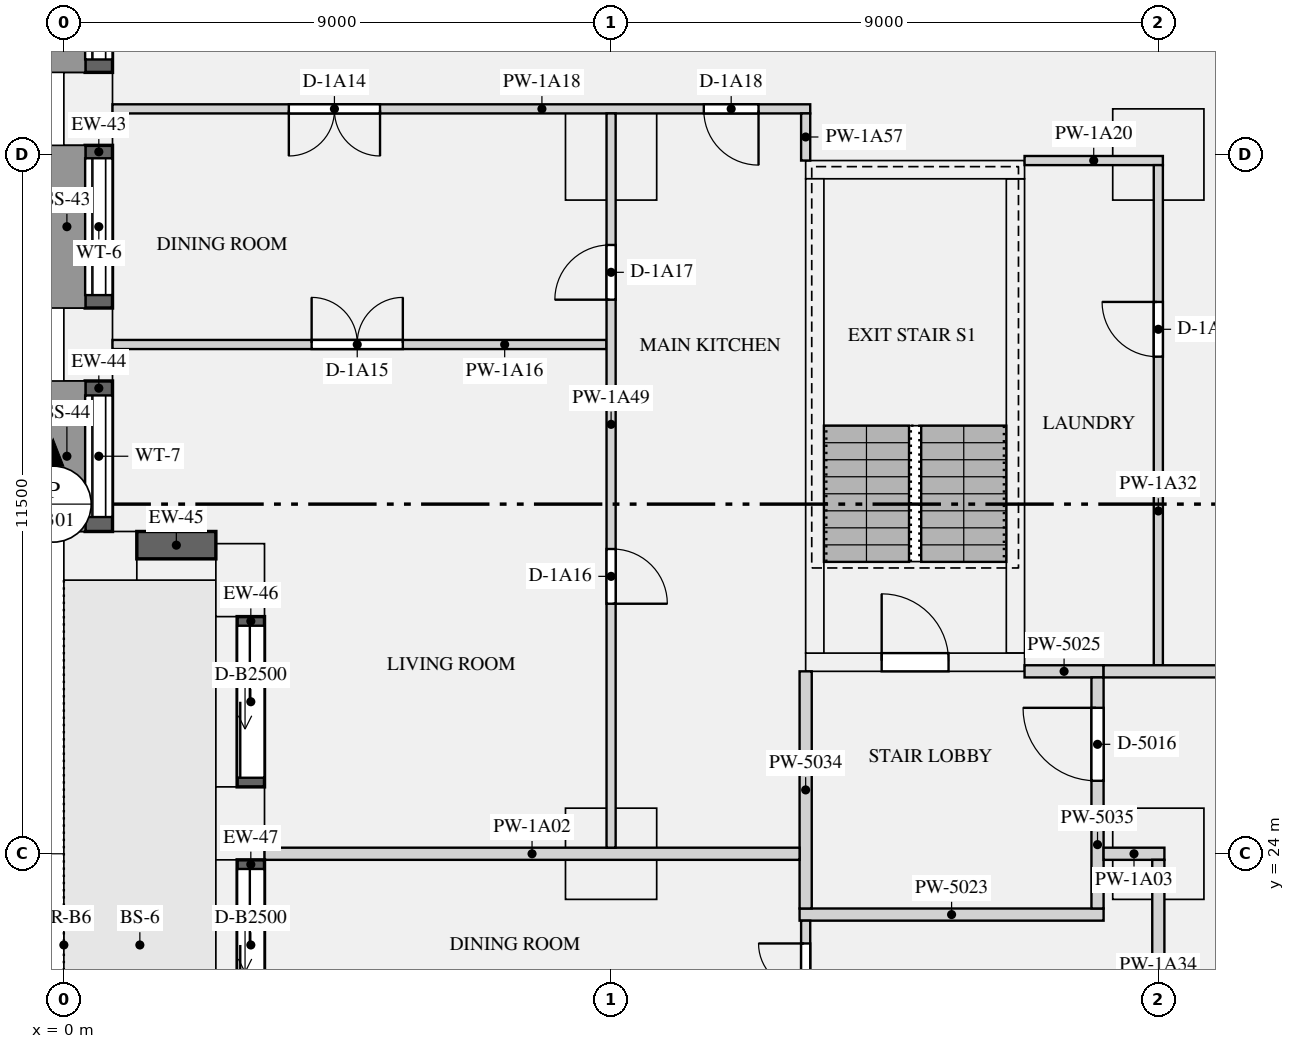
"""IFC4 building model, lengths in metres.
Left out: names, types, materials, properties, quantities, classifications, styles, units other than length and angle.
Written with IfcOpenShell. Run it as: python <this file> out.ifc"""

import sys

from ifc_helpers import new_model, si_unit, direction, frame, frame_2d, origin, origin_2d, place, context, subcontext, project, spatial, rectangle, extrude, element, fill, save


model = new_model("IFC4")
c1 = context("Model", 3, precision=1e-05, world=origin(), true_north=direction((0.0, 1.0)))
c2 = subcontext(c1, "Body", "Model", "MODEL_VIEW")
j1 = project(units=[si_unit("LENGTHUNIT", "METRE"), si_unit("PLANEANGLEUNIT", "RADIAN")], contexts=[c1])
p1 = place(None, origin())
s1 = spatial("IfcSite", under=j1, at=p1, CompositionType="ELEMENT")
p2 = place(p1, origin())
s2 = spatial("IfcBuilding", under=s1, at=p2, CompositionType="ELEMENT")
p3 = place(p2, frame((0.0, 0.0, 19.5)))
s3 = spatial("IfcBuildingStorey", under=s2, at=p3, CompositionType="ELEMENT", Elevation=19.5)
for number, where, z_axis, x_axis in (
    (1, (0.4, 36.25, -0.32), (0.0, 0.0, 1.0), (0.0, -1.0, 0.0)),
    (2, (0.4, 32.375, -0.32), (0.0, 0.0, 1.0), (0.0, -1.0, 0.0)),
):
    element("IfcColumn", number, at=place(p3, frame(where, z_axis=z_axis, x_axis=x_axis)), inside=s3, PredefinedType="USERDEFINED", context=c2, shape_type="SweptSolid", body=[
        extrude(rectangle(XDim=1.2, YDim=0.8, at=origin_2d()), origin(), (0.0, 0.0, 1.0), 3.47),
    ])
for number, where, z_axis, x_axis in (
    (3, (0.6, 28.9, 0.0), (0.0, 0.0, 1.0), (1.0, 0.0, 0.0)),
    (4, (2.9, 28.5, 0.0), (0.0, 0.0, 1.0), (0.0, -1.0, 0.0)),
):
    element("IfcColumn", number, at=place(p3, frame(where, z_axis=z_axis, x_axis=x_axis)), inside=s3, PredefinedType="USERDEFINED", context=c2, shape_type="SweptSolid", body=[
        extrude(rectangle(XDim=1.2, YDim=0.8, at=origin_2d()), origin(), (0.0, 0.0, 1.0), 3.15),
    ])
p4 = place(p3, frame((2.9, 24.5, -0.32), z_axis=(0.0, 0.0, 1.0), x_axis=(0.0, -1.0, 0.0)))
e5 = element("IfcColumn", 5, at=p4, inside=s3, PredefinedType="USERDEFINED", context=c2, shape_type="SweptSolid", body=[
    extrude(rectangle(XDim=1.2, YDim=0.8, at=origin_2d()), origin(), (0.0, 0.0, 1.0), 3.47),
])
for number, where, z_axis, x_axis in (
    (6, (9.0, 24.0, 0.0), (0.0, 0.0, 1.0), (1.0, 0.0, 0.0)),
    (7, (18.0, 24.0, 0.0), (0.0, 0.0, 1.0), (1.0, 0.0, 0.0)),
    (8, (9.0, 35.5, 0.0), (0.0, 0.0, 1.0), (1.0, 0.0, 0.0)),
    (9, (18.0, 35.5, 0.0), (0.0, 0.0, 1.0), (1.0, 0.0, 0.0)),
):
    element("IfcColumn", number, at=place(p3, frame(where, z_axis=z_axis, x_axis=x_axis)), inside=s3, PredefinedType="COLUMN", context=c2, shape_type="SweptSolid", body=[
        extrude(rectangle(XDim=1.5, YDim=1.5, at=origin_2d()), origin(), (0.0, 0.0, 1.0), 3.15),
    ])
p5 = place(p3, frame((12.2, 27.15, 0.0), z_axis=(0.0, 0.0, 1.0), x_axis=(1.0, 0.0, 0.0)))
e10 = element("IfcWall", 10, at=p5, inside=s3, PredefinedType="SHEAR", context=c2, shape_type="SweptSolid", body=[
    extrude(rectangle(XDim=3.6, YDim=0.3, at=frame_2d((1.8, 0.0))), origin(), (0.0, 0.0, 1.0), 3.15),
])
p6 = place(p5, frame((1.25, 0.0, 0.0)))
e11 = element("IfcOpeningElement", 11, at=p6, cuts=e10, PredefinedType="OPENING", context=c2, shape_type="SweptSolid", body=[
    extrude(rectangle(XDim=1.1, YDim=2.1, at=frame_2d((0.55, 1.05))), frame((0.0, 0.16, 0.0), z_axis=(0.0, -1.0, 0.0), x_axis=(1.0, 0.0, 0.0)), (0.0, 0.0, 1.0), 0.32),
])
p7 = place(p3, frame((12.2, 35.25, 0.0), z_axis=(0.0, 0.0, 1.0), x_axis=(1.0, 0.0, 0.0)))
e12 = element("IfcWall", 12, at=p7, inside=s3, PredefinedType="SHEAR", context=c2, shape_type="SweptSolid", body=[
    extrude(rectangle(XDim=3.6, YDim=0.3, at=frame_2d((1.8, 0.0))), origin(), (0.0, 0.0, 1.0), 3.15),
])
for number, where, z_axis, x_axis in (
    (13, (12.35, 27.3, 0.0), (0.0, 0.0, 1.0), (0.0, 1.0, 0.0)),
    (14, (15.65, 27.3, 0.0), (0.0, 0.0, 1.0), (0.0, 1.0, 0.0)),
):
    element("IfcWall", number, at=place(p3, frame(where, z_axis=z_axis, x_axis=x_axis)), inside=s3, PredefinedType="SHEAR", context=c2, shape_type="SweptSolid", body=[
        extrude(rectangle(XDim=7.8, YDim=0.3, at=frame_2d((3.9, 0.0))), origin(), (0.0, 0.0, 1.0), 3.15),
    ])
p8 = place(p3, frame((0.575, 39.525, 0.9), z_axis=(0.0, 0.0, 1.0), x_axis=(0.0, -1.0, 0.0)))
e15 = element("IfcWall", 15, at=p8, inside=s3, PredefinedType="SOLIDWALL", context=c2, shape_type="SweptSolid", body=[
    extrude(rectangle(XDim=2.675, YDim=0.45, at=frame_2d((1.337, 0.0))), origin(), (0.0, 0.0, 1.0), 1.93),
])
p9 = place(p8, frame((0.212, 0.0, 0.15)))
e16 = element("IfcOpeningElement", 16, at=p9, cuts=e15, PredefinedType="OPENING", context=c2, shape_type="SweptSolid", body=[
    extrude(rectangle(XDim=2.25, YDim=1.5, at=frame_2d((1.125, 0.75))), frame((0.0, 0.235, 0.0), z_axis=(0.0, -1.0, 0.0), x_axis=(1.0, 0.0, 0.0)), (0.0, 0.0, 1.0), 0.47),
])
p10 = place(p3, frame((0.575, 35.65, 0.9), z_axis=(0.0, 0.0, 1.0), x_axis=(0.0, -1.0, 0.0)))
e17 = element("IfcWall", 17, at=p10, inside=s3, PredefinedType="SOLIDWALL", context=c2, shape_type="SweptSolid", body=[
    extrude(rectangle(XDim=2.675, YDim=0.45, at=frame_2d((1.337, 0.0))), origin(), (0.0, 0.0, 1.0), 1.93),
])
p11 = place(p10, frame((0.212, 0.0, 0.15)))
e18 = element("IfcOpeningElement", 18, at=p11, cuts=e17, PredefinedType="OPENING", context=c2, shape_type="SweptSolid", body=[
    extrude(rectangle(XDim=2.25, YDim=1.5, at=frame_2d((1.125, 0.75))), frame((0.0, 0.235, 0.0), z_axis=(0.0, -1.0, 0.0), x_axis=(1.0, 0.0, 0.0)), (0.0, 0.0, 1.0), 0.47),
])
p12 = place(p3, frame((0.575, 31.775, 0.9), z_axis=(0.0, 0.0, 1.0), x_axis=(0.0, -1.0, 0.0)))
e19 = element("IfcWall", 19, at=p12, inside=s3, PredefinedType="SOLIDWALL", context=c2, shape_type="SweptSolid", body=[
    extrude(rectangle(XDim=2.475, YDim=0.45, at=frame_2d((1.237, 0.0))), origin(), (0.0, 0.0, 1.0), 1.93),
])
p13 = place(p12, frame((0.238, 0.0, 0.15)))
e20 = element("IfcOpeningElement", 20, at=p13, cuts=e19, PredefinedType="OPENING", context=c2, shape_type="SweptSolid", body=[
    extrude(rectangle(XDim=2.0, YDim=1.5, at=frame_2d((1.0, 0.75))), frame((0.0, 0.235, 0.0), z_axis=(0.0, -1.0, 0.0), x_axis=(1.0, 0.0, 0.0)), (0.0, 0.0, 1.0), 0.47),
])
p14 = place(p3, frame((1.2, 29.075, 0.9), z_axis=(0.0, 0.0, 1.0), x_axis=(1.0, 0.0, 0.0)))
e21 = element("IfcWall", 21, at=p14, inside=s3, PredefinedType="SOLIDWALL", context=c2, shape_type="SweptSolid", body=[
    extrude(rectangle(XDim=1.3, YDim=0.45, at=frame_2d((0.65, 0.0))), origin(), (0.0, 0.0, 1.0), 1.93),
])
p15 = place(p3, frame((3.075, 27.9, 0.0), z_axis=(0.0, 0.0, 1.0), x_axis=(0.0, -1.0, 0.0)))
e22 = element("IfcWall", 22, at=p15, inside=s3, PredefinedType="SOLIDWALL", context=c2, shape_type="SweptSolid", body=[
    extrude(rectangle(XDim=2.8, YDim=0.45, at=frame_2d((1.4, 0.0))), origin(), (0.0, 0.0, 1.0), 2.83),
])
p16 = place(p15, frame((0.15, 0.0, 0.0)))
e23 = element("IfcOpeningElement", 23, at=p16, cuts=e22, PredefinedType="OPENING", context=c2, shape_type="SweptSolid", body=[
    extrude(rectangle(XDim=2.5, YDim=2.3, at=frame_2d((1.25, 1.15))), frame((0.0, 0.235, 0.0), z_axis=(0.0, -1.0, 0.0), x_axis=(1.0, 0.0, 0.0)), (0.0, 0.0, 1.0), 0.47),
])
p17 = place(p3, frame((3.075, 23.9, 0.0), z_axis=(0.0, 0.0, 1.0), x_axis=(0.0, -1.0, 0.0)))
e24 = element("IfcWall", 24, at=p17, inside=s3, PredefinedType="SOLIDWALL", context=c2, shape_type="SweptSolid", body=[
    extrude(rectangle(XDim=2.8, YDim=0.45, at=frame_2d((1.4, 0.0))), origin(), (0.0, 0.0, 1.0), 2.83),
])
p18 = place(p17, frame((0.15, 0.0, 0.0)))
e25 = element("IfcOpeningElement", 25, at=p18, cuts=e24, PredefinedType="OPENING", context=c2, shape_type="SweptSolid", body=[
    extrude(rectangle(XDim=2.5, YDim=2.3, at=frame_2d((1.25, 1.15))), frame((0.0, 0.235, 0.0), z_axis=(0.0, -1.0, 0.0), x_axis=(1.0, 0.0, 0.0)), (0.0, 0.0, 1.0), 0.47),
])
p19 = place(p3, frame((12.1, 23.0, 0.0), z_axis=(0.0, 0.0, 1.0), x_axis=(1.0, 0.0, 0.0)))
e26 = element("IfcWall", 26, at=p19, inside=s3, PredefinedType="PARTITIONING", context=c2, shape_type="SweptSolid", body=[
    extrude(rectangle(XDim=5.0, YDim=0.2, at=frame_2d((2.5, 0.0))), origin(), (0.0, 0.0, 1.0), 2.83),
])
p20 = place(p3, frame((15.8, 27.0, 0.0), z_axis=(0.0, 0.0, 1.0), x_axis=(1.0, 0.0, 0.0)))
e27 = element("IfcWall", 27, at=p20, inside=s3, PredefinedType="PARTITIONING", context=c2, shape_type="SweptSolid", body=[
    extrude(rectangle(XDim=1.3, YDim=0.2, at=frame_2d((0.65, 0.0))), origin(), (0.0, 0.0, 1.0), 2.83),
])
p21 = place(p3, frame((12.2, 23.1, 0.0), z_axis=(0.0, 0.0, 1.0), x_axis=(0.0, 1.0, 0.0)))
e28 = element("IfcWall", 28, at=p21, inside=s3, PredefinedType="PARTITIONING", context=c2, shape_type="SweptSolid", body=[
    extrude(rectangle(XDim=3.9, YDim=0.2, at=frame_2d((1.95, 0.0))), origin(), (0.0, 0.0, 1.0), 2.83),
])
p22 = place(p3, frame((17.0, 23.1, 0.0), z_axis=(0.0, 0.0, 1.0), x_axis=(0.0, 1.0, 0.0)))
e29 = element("IfcWall", 29, at=p22, inside=s3, PredefinedType="PARTITIONING", context=c2, shape_type="SweptSolid", body=[
    extrude(rectangle(XDim=3.8, YDim=0.2, at=frame_2d((1.9, 0.0))), origin(), (0.0, 0.0, 1.0), 2.83),
])
p23 = place(p22, frame((2.1, 0.0, 0.0)))
e30 = element("IfcOpeningElement", 30, at=p23, cuts=e29, PredefinedType="OPENING", context=c2, shape_type="SweptSolid", body=[
    extrude(rectangle(XDim=1.2, YDim=2.1, at=frame_2d((0.6, 1.05))), frame((0.0, 0.11, 0.0), z_axis=(0.0, -1.0, 0.0), x_axis=(1.0, 0.0, 0.0)), (0.0, 0.0, 1.0), 0.22),
])
p24 = place(p3, frame((3.3, 24.0, 0.0), z_axis=(0.0, 0.0, 1.0), x_axis=(1.0, 0.0, 0.0)))
e31 = element("IfcWall", 31, at=p24, inside=s3, PredefinedType="PARTITIONING", context=c2, shape_type="SweptSolid", body=[
    extrude(rectangle(XDim=8.8, YDim=0.2, at=frame_2d((4.4, 0.0))), origin(), (0.0, 0.0, 1.0), 2.83),
])
p25 = place(p3, frame((17.1, 24.0, 0.0), z_axis=(0.0, 0.0, 1.0), x_axis=(1.0, 0.0, 0.0)))
e32 = element("IfcWall", 32, at=p25, inside=s3, PredefinedType="PARTITIONING", context=c2, shape_type="SweptSolid", body=[
    extrude(rectangle(XDim=1.0, YDim=0.2, at=frame_2d((0.5, 0.0))), origin(), (0.0, 0.0, 1.0), 2.83),
])
p26 = place(p3, frame((17.1, 27.0, 0.0), z_axis=(0.0, 0.0, 1.0), x_axis=(1.0, 0.0, 0.0)))
e33 = element("IfcWall", 33, at=p26, inside=s3, PredefinedType="PARTITIONING", context=c2, shape_type="SweptSolid", body=[
    extrude(rectangle(XDim=7.0, YDim=0.2, at=frame_2d((3.5, 0.0))), origin(), (0.0, 0.0, 1.0), 2.83),
])
p27 = place(p3, frame((0.8, 32.375, 0.0), z_axis=(0.0, 0.0, 1.0), x_axis=(1.0, 0.0, 0.0)))
e34 = element("IfcWall", 34, at=p27, inside=s3, PredefinedType="PARTITIONING", context=c2, shape_type="SweptSolid", body=[
    extrude(rectangle(XDim=8.125, YDim=0.15, at=frame_2d((4.062, 0.0))), origin(), (0.0, 0.0, 1.0), 2.83),
])
p28 = place(p27, frame((3.275, 0.0, 0.0)))
e35 = element("IfcOpeningElement", 35, at=p28, cuts=e34, PredefinedType="OPENING", context=c2, shape_type="SweptSolid", body=[
    extrude(rectangle(XDim=1.5, YDim=2.1, at=frame_2d((0.75, 1.05))), frame((0.0, 0.085, 0.0), z_axis=(0.0, -1.0, 0.0), x_axis=(1.0, 0.0, 0.0)), (0.0, 0.0, 1.0), 0.17),
])
p29 = place(p3, frame((0.8, 36.25, 0.0), z_axis=(0.0, 0.0, 1.0), x_axis=(1.0, 0.0, 0.0)))
e36 = element("IfcWall", 36, at=p29, inside=s3, PredefinedType="PARTITIONING", context=c2, shape_type="SweptSolid", body=[
    extrude(rectangle(XDim=11.475, YDim=0.15, at=frame_2d((5.737, 0.0))), origin(), (0.0, 0.0, 1.0), 2.83),
])
p30 = place(p29, frame((2.9, 0.0, 0.0)))
e37 = element("IfcOpeningElement", 37, at=p30, cuts=e36, PredefinedType="OPENING", context=c2, shape_type="SweptSolid", body=[
    extrude(rectangle(XDim=1.5, YDim=2.1, at=frame_2d((0.75, 1.05))), frame((0.0, 0.085, 0.0), z_axis=(0.0, -1.0, 0.0), x_axis=(1.0, 0.0, 0.0)), (0.0, 0.0, 1.0), 0.17),
])
p31 = place(p29, frame((9.725, 0.0, 0.0)))
e38 = element("IfcOpeningElement", 38, at=p31, cuts=e36, PredefinedType="OPENING", context=c2, shape_type="SweptSolid", body=[
    extrude(rectangle(XDim=0.9, YDim=2.1, at=frame_2d((0.45, 1.05))), frame((0.0, 0.085, 0.0), z_axis=(0.0, -1.0, 0.0), x_axis=(1.0, 0.0, 0.0)), (0.0, 0.0, 1.0), 0.17),
])
p32 = place(p3, frame((15.8, 35.4, 0.0), z_axis=(0.0, 0.0, 1.0), x_axis=(1.0, 0.0, 0.0)))
e39 = element("IfcWall", 39, at=p32, inside=s3, PredefinedType="PARTITIONING", context=c2, shape_type="SweptSolid", body=[
    extrude(rectangle(XDim=2.275, YDim=0.15, at=frame_2d((1.137, 0.0))), origin(), (0.0, 0.0, 1.0), 2.83),
])
p33 = place(p3, frame((18.0, 27.1, 0.0), z_axis=(0.0, 0.0, 1.0), x_axis=(0.0, 1.0, 0.0)))
e40 = element("IfcWall", 40, at=p33, inside=s3, PredefinedType="PARTITIONING", context=c2, shape_type="SweptSolid", body=[
    extrude(rectangle(XDim=8.225, YDim=0.15, at=frame_2d((4.112, 0.0))), origin(), (0.0, 0.0, 1.0), 2.83),
])
p34 = place(p33, frame((5.075, 0.0, 0.0)))
e41 = element("IfcOpeningElement", 41, at=p34, cuts=e40, PredefinedType="OPENING", context=c2, shape_type="SweptSolid", body=[
    extrude(rectangle(XDim=0.9, YDim=2.1, at=frame_2d((0.45, 1.05))), frame((0.0, 0.085, 0.0), z_axis=(0.0, -1.0, 0.0), x_axis=(1.0, 0.0, 0.0)), (0.0, 0.0, 1.0), 0.17),
])
p35 = place(p3, frame((18.0, 16.1, 0.0), z_axis=(0.0, 0.0, 1.0), x_axis=(0.0, 1.0, 0.0)))
e42 = element("IfcWall", 42, at=p35, inside=s3, PredefinedType="PARTITIONING", context=c2, shape_type="SweptSolid", body=[
    extrude(rectangle(XDim=7.8, YDim=0.2, at=frame_2d((3.9, 0.0))), origin(), (0.0, 0.0, 1.0), 2.83),
])
p36 = place(p35, frame((2.35, 0.0, 0.0)))
e43 = element("IfcOpeningElement", 43, at=p36, cuts=e42, PredefinedType="OPENING", context=c2, shape_type="SweptSolid", body=[
    extrude(rectangle(XDim=1.1, YDim=2.1, at=frame_2d((0.55, 1.05))), frame((0.0, 0.11, 0.0), z_axis=(0.0, -1.0, 0.0), x_axis=(1.0, 0.0, 0.0)), (0.0, 0.0, 1.0), 0.22),
])
p37 = place(p3, frame((9.0, 24.1, 0.0), z_axis=(0.0, 0.0, 1.0), x_axis=(0.0, 1.0, 0.0)))
e44 = element("IfcWall", 44, at=p37, inside=s3, PredefinedType="PARTITIONING", context=c2, shape_type="SweptSolid", body=[
    extrude(rectangle(XDim=12.075, YDim=0.15, at=frame_2d((6.038, 0.0))), origin(), (0.0, 0.0, 1.0), 2.83),
])
p38 = place(p37, frame((4.012, 0.0, 0.0)))
e45 = element("IfcOpeningElement", 45, at=p38, cuts=e44, PredefinedType="OPENING", context=c2, shape_type="SweptSolid", body=[
    extrude(rectangle(XDim=0.9, YDim=2.1, at=frame_2d((0.45, 1.05))), frame((0.0, 0.085, 0.0), z_axis=(0.0, -1.0, 0.0), x_axis=(1.0, 0.0, 0.0)), (0.0, 0.0, 1.0), 0.17),
])
p39 = place(p37, frame((9.012, 0.0, 0.0)))
e46 = element("IfcOpeningElement", 46, at=p39, cuts=e44, PredefinedType="OPENING", context=c2, shape_type="SweptSolid", body=[
    extrude(rectangle(XDim=0.9, YDim=2.1, at=frame_2d((0.45, 1.05))), frame((0.0, 0.085, 0.0), z_axis=(0.0, -1.0, 0.0), x_axis=(1.0, 0.0, 0.0)), (0.0, 0.0, 1.0), 0.17),
])
p40 = place(p3, frame((12.2, 20.575, 0.0), z_axis=(0.0, 0.0, 1.0), x_axis=(0.0, 1.0, 0.0)))
e47 = element("IfcWall", 47, at=p40, inside=s3, PredefinedType="PARTITIONING", context=c2, shape_type="SweptSolid", body=[
    extrude(rectangle(XDim=2.325, YDim=0.15, at=frame_2d((1.163, 0.0))), origin(), (0.0, 0.0, 1.0), 2.83),
])
p41 = place(p40, frame((0.45, 0.0, 0.0)))
e48 = element("IfcOpeningElement", 48, at=p41, cuts=e47, PredefinedType="OPENING", context=c2, shape_type="SweptSolid", body=[
    extrude(rectangle(XDim=1.5, YDim=2.1, at=frame_2d((0.75, 1.05))), frame((0.0, 0.085, 0.0), z_axis=(0.0, -1.0, 0.0), x_axis=(1.0, 0.0, 0.0)), (0.0, 0.0, 1.0), 0.17),
])
p42 = place(p3, frame((12.2, 35.4, 0.0), z_axis=(0.0, 0.0, 1.0), x_axis=(0.0, 1.0, 0.0)))
e49 = element("IfcWall", 49, at=p42, inside=s3, PredefinedType="PARTITIONING", context=c2, shape_type="SweptSolid", body=[
    extrude(rectangle(XDim=0.775, YDim=0.15, at=frame_2d((0.388, 0.0))), origin(), (0.0, 0.0, 1.0), 2.83),
])
p43 = place(p9, origin())
e50 = element("IfcWindow", 50, at=p43, inside=s3, PartitioningType="SINGLE_PANEL", PredefinedType="WINDOW", context=c2, shape_type="SweptSolid", body=[
    extrude(rectangle(XDim=2.25, YDim=1.5, at=frame_2d((1.125, 0.75))), frame((0.0, -0.065, 0.0), z_axis=(0.0, -1.0, 0.0), x_axis=(1.0, 0.0, 0.0)), (0.0, 0.0, 1.0), 0.06),
])
fill(e16, e50)
p44 = place(p11, origin())
e51 = element("IfcWindow", 51, at=p44, inside=s3, PartitioningType="SINGLE_PANEL", PredefinedType="WINDOW", context=c2, shape_type="SweptSolid", body=[
    extrude(rectangle(XDim=2.25, YDim=1.5, at=frame_2d((1.125, 0.75))), frame((0.0, -0.065, 0.0), z_axis=(0.0, -1.0, 0.0), x_axis=(1.0, 0.0, 0.0)), (0.0, 0.0, 1.0), 0.06),
])
fill(e18, e51)
p45 = place(p13, origin())
e52 = element("IfcWindow", 52, at=p45, inside=s3, PartitioningType="SINGLE_PANEL", PredefinedType="WINDOW", context=c2, shape_type="SweptSolid", body=[
    extrude(rectangle(XDim=2.0, YDim=1.5, at=frame_2d((1.0, 0.75))), frame((0.0, -0.065, 0.0), z_axis=(0.0, -1.0, 0.0), x_axis=(1.0, 0.0, 0.0)), (0.0, 0.0, 1.0), 0.06),
])
fill(e20, e52)
p46 = place(p16, origin())
e53 = element("IfcDoor", 53, at=p46, inside=s3, OperationType="SLIDING_TO_LEFT", PredefinedType="DOOR", context=c2, shape_type="SweptSolid", body=[
    extrude(rectangle(XDim=2.5, YDim=2.3, at=frame_2d((1.25, 1.15))), frame((0.0, -0.07, 0.0), z_axis=(0.0, -1.0, 0.0), x_axis=(1.0, 0.0, 0.0)), (0.0, 0.0, 1.0), 0.05),
])
fill(e23, e53)
p47 = place(p18, origin())
e54 = element("IfcDoor", 54, at=p47, inside=s3, OperationType="SLIDING_TO_LEFT", PredefinedType="DOOR", context=c2, shape_type="SweptSolid", body=[
    extrude(rectangle(XDim=2.5, YDim=2.3, at=frame_2d((1.25, 1.15))), frame((0.0, -0.07, 0.0), z_axis=(0.0, -1.0, 0.0), x_axis=(1.0, 0.0, 0.0)), (0.0, 0.0, 1.0), 0.05),
])
fill(e25, e54)
p48 = place(p6, origin())
e55 = element("IfcDoor", 55, at=p48, inside=s3, OperationType="SINGLE_SWING_LEFT", PredefinedType="DOOR", context=c2, shape_type="SweptSolid", body=[
    extrude(rectangle(XDim=1.1, YDim=2.1, at=frame_2d((0.55, 1.05))), frame((0.0, 0.025, 0.0), z_axis=(0.0, -1.0, 0.0), x_axis=(1.0, 0.0, 0.0)), (0.0, 0.0, 1.0), 0.05),
])
fill(e11, e55)
p49 = place(p23, origin())
e56 = element("IfcDoor", 56, at=p49, inside=s3, OperationType="SINGLE_SWING_RIGHT", PredefinedType="DOOR", context=c2, shape_type="SweptSolid", body=[
    extrude(rectangle(XDim=1.2, YDim=2.1, at=frame_2d((0.6, 1.05))), frame((0.0, 0.025, 0.0), z_axis=(0.0, -1.0, 0.0), x_axis=(1.0, 0.0, 0.0)), (0.0, 0.0, 1.0), 0.05),
])
fill(e30, e56)
p50 = place(p41, origin())
e57 = element("IfcDoor", 57, at=p50, inside=s3, OperationType="DOUBLE_DOOR_SINGLE_SWING", PredefinedType="DOOR", context=c2, shape_type="SweptSolid", body=[
    extrude(rectangle(XDim=1.5, YDim=2.1, at=frame_2d((0.75, 1.05))), frame((0.0, 0.025, 0.0), z_axis=(0.0, -1.0, 0.0), x_axis=(1.0, 0.0, 0.0)), (0.0, 0.0, 1.0), 0.05),
])
fill(e48, e57)
p51 = place(p30, frame((1.5, 0.0, 0.0), z_axis=(0.0, 0.0, 1.0), x_axis=(-1.0, 0.0, 0.0)))
e58 = element("IfcDoor", 58, at=p51, inside=s3, OperationType="DOUBLE_DOOR_SINGLE_SWING", PredefinedType="DOOR", context=c2, shape_type="SweptSolid", body=[
    extrude(rectangle(XDim=1.5, YDim=2.1, at=frame_2d((0.75, 1.05))), frame((0.0, 0.025, 0.0), z_axis=(0.0, -1.0, 0.0), x_axis=(1.0, 0.0, 0.0)), (0.0, 0.0, 1.0), 0.05),
])
fill(e37, e58)
p52 = place(p28, origin())
e59 = element("IfcDoor", 59, at=p52, inside=s3, OperationType="DOUBLE_DOOR_SINGLE_SWING", PredefinedType="DOOR", context=c2, shape_type="SweptSolid", body=[
    extrude(rectangle(XDim=1.5, YDim=2.1, at=frame_2d((0.75, 1.05))), frame((0.0, 0.025, 0.0), z_axis=(0.0, -1.0, 0.0), x_axis=(1.0, 0.0, 0.0)), (0.0, 0.0, 1.0), 0.05),
])
fill(e35, e59)
p53 = place(p38, frame((0.9, 0.0, 0.0), z_axis=(0.0, 0.0, 1.0), x_axis=(-1.0, 0.0, 0.0)))
e60 = element("IfcDoor", 60, at=p53, inside=s3, OperationType="SINGLE_SWING_RIGHT", PredefinedType="DOOR", context=c2, shape_type="SweptSolid", body=[
    extrude(rectangle(XDim=0.9, YDim=2.1, at=frame_2d((0.45, 1.05))), frame((0.0, 0.025, 0.0), z_axis=(0.0, -1.0, 0.0), x_axis=(1.0, 0.0, 0.0)), (0.0, 0.0, 1.0), 0.05),
])
fill(e45, e60)
p54 = place(p39, origin())
e61 = element("IfcDoor", 61, at=p54, inside=s3, OperationType="SINGLE_SWING_LEFT", PredefinedType="DOOR", context=c2, shape_type="SweptSolid", body=[
    extrude(rectangle(XDim=0.9, YDim=2.1, at=frame_2d((0.45, 1.05))), frame((0.0, 0.025, 0.0), z_axis=(0.0, -1.0, 0.0), x_axis=(1.0, 0.0, 0.0)), (0.0, 0.0, 1.0), 0.05),
])
fill(e46, e61)
p55 = place(p31, frame((0.9, 0.0, 0.0), z_axis=(0.0, 0.0, 1.0), x_axis=(-1.0, 0.0, 0.0)))
e62 = element("IfcDoor", 62, at=p55, inside=s3, OperationType="SINGLE_SWING_LEFT", PredefinedType="DOOR", context=c2, shape_type="SweptSolid", body=[
    extrude(rectangle(XDim=0.9, YDim=2.1, at=frame_2d((0.45, 1.05))), frame((0.0, 0.025, 0.0), z_axis=(0.0, -1.0, 0.0), x_axis=(1.0, 0.0, 0.0)), (0.0, 0.0, 1.0), 0.05),
])
fill(e38, e62)
p56 = place(p34, origin())
e63 = element("IfcDoor", 63, at=p56, inside=s3, OperationType="SINGLE_SWING_RIGHT", PredefinedType="DOOR", context=c2, shape_type="SweptSolid", body=[
    extrude(rectangle(XDim=0.9, YDim=2.1, at=frame_2d((0.45, 1.05))), frame((0.0, 0.025, 0.0), z_axis=(0.0, -1.0, 0.0), x_axis=(1.0, 0.0, 0.0)), (0.0, 0.0, 1.0), 0.05),
])
fill(e41, e63)
save(model, sys.argv[1])
